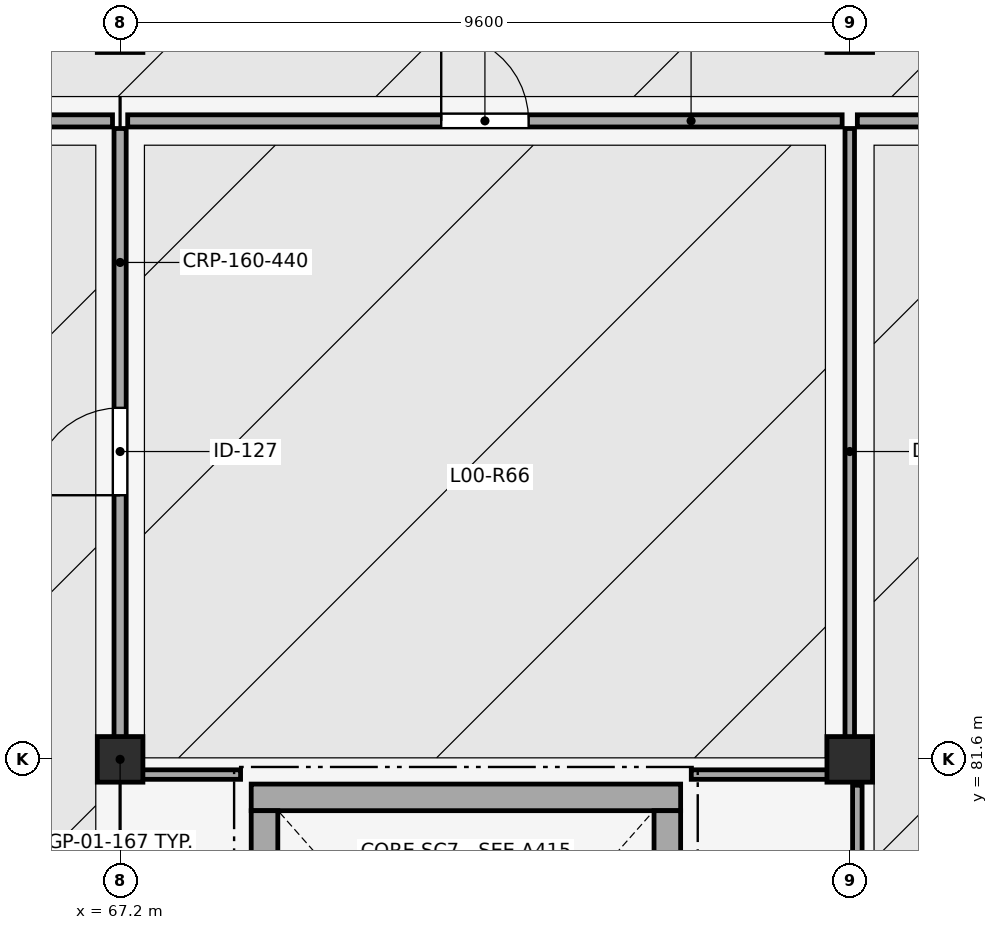
"""IFC4 building model, lengths in metres.
Left out: names, types, materials, properties, quantities, classifications, styles, units other than length and angle.
Written with IfcOpenShell. Run it as: python <this file> out.ifc"""

import sys

from ifc_helpers import new_model, si_unit, direction, frame, frame_2d, origin, origin_2d, place, context, subcontext, project, spatial, rectangle, extrude, element, fill, save


model = new_model("IFC4")
c1 = context("Model", 3, precision=1e-05, world=origin(), true_north=direction((0.0, 1.0)))
c2 = subcontext(c1, "Body", "Model", "MODEL_VIEW")
j1 = project(units=[si_unit("LENGTHUNIT", "METRE"), si_unit("PLANEANGLEUNIT", "RADIAN")], contexts=[c1])
p1 = place(None, origin())
s1 = spatial("IfcSite", under=j1, at=p1, CompositionType="ELEMENT")
p2 = place(p1, origin())
s2 = spatial("IfcBuilding", under=s1, at=p2, CompositionType="ELEMENT")
p3 = place(p2, origin())
s3 = spatial("IfcBuildingStorey", under=s2, at=p3, CompositionType="ELEMENT", Elevation=0.0)
for number, where, z_axis, x_axis in (
    (1, (67.2, 81.6, 0.0), (0.0, 0.0, 1.0), (1.0, 0.0, 0.0)),
    (2, (76.8, 81.6, 0.0), (0.0, 0.0, 1.0), (1.0, 0.0, 0.0)),
):
    element("IfcColumn", number, at=place(p3, frame(where, z_axis=z_axis, x_axis=x_axis)), inside=s3, PredefinedType="COLUMN", context=c2, shape_type="SweptSolid", body=[
        extrude(rectangle(XDim=0.6, YDim=0.6, at=origin_2d()), origin(), (0.0, 0.0, 1.0), 4.8),
    ])
p4 = place(p3, frame((68.925, 81.1, 0.0), z_axis=(0.0, 0.0, 1.0), x_axis=(1.0, 0.0, 0.0)))
e3 = element("IfcWall", 3, at=p4, inside=s3, PredefinedType="SHEAR", context=c2, shape_type="SweptSolid", body=[
    extrude(rectangle(XDim=5.65, YDim=0.35, at=frame_2d((2.825, 0.0))), origin(), (0.0, 0.0, 1.0), 4.55),
])
p5 = place(p3, frame((69.1, 72.975, 0.0), z_axis=(0.0, 0.0, 1.0), x_axis=(0.0, 1.0, 0.0)))
e4 = element("IfcWall", 4, at=p5, inside=s3, PredefinedType="SHEAR", context=c2, shape_type="SweptSolid", body=[
    extrude(rectangle(XDim=7.95, YDim=0.35, at=frame_2d((3.975, 0.0))), origin(), (0.0, 0.0, 1.0), 4.55),
])
p6 = place(p3, frame((74.4, 80.925, 0.0), z_axis=(0.0, 0.0, 1.0), x_axis=(0.0, -1.0, 0.0)))
e5 = element("IfcWall", 5, at=p6, inside=s3, PredefinedType="SHEAR", context=c2, shape_type="SweptSolid", body=[
    extrude(rectangle(XDim=7.95, YDim=0.35, at=frame_2d((3.975, 0.0))), origin(), (0.0, 0.0, 1.0), 4.55),
])
p7 = place(p6, frame((5.68, 0.0, 0.0)))
e6 = element("IfcOpeningElement", 6, at=p7, cuts=e5, PredefinedType="OPENING", context=c2, shape_type="SweptSolid", body=[
    extrude(rectangle(XDim=2.05, YDim=2.15, at=frame_2d((1.025, 1.075))), frame((0.0, 0.185, 0.0), z_axis=(0.0, -1.0, 0.0), x_axis=(1.0, 0.0, 0.0)), (0.0, 0.0, 1.0), 0.37),
])
p8 = place(p3, frame((67.2, 81.4, 0.0), z_axis=(0.0, 0.0, 1.0), x_axis=(0.0, 1.0, 0.0)))
e7 = element("IfcWall", 7, at=p8, inside=s3, PredefinedType="PARTITIONING", context=c2, shape_type="SweptSolid", body=[
    extrude(rectangle(XDim=8.5, YDim=0.16, at=frame_2d((4.25, 0.0))), origin(), (0.0, 0.0, 1.0), 3.92),
])
p9 = place(p8, frame((3.675, 0.0, 0.0)))
e8 = element("IfcOpeningElement", 8, at=p9, cuts=e7, PredefinedType="OPENING", context=c2, shape_type="SweptSolid", body=[
    extrude(rectangle(XDim=1.15, YDim=2.2, at=frame_2d((0.575, 1.1))), frame((0.0, 0.09, 0.0), z_axis=(0.0, -1.0, 0.0), x_axis=(1.0, 0.0, 0.0)), (0.0, 0.0, 1.0), 0.18),
])
p10 = place(p3, frame((55.8, 90.0, 0.0), z_axis=(0.0, 0.0, 1.0), x_axis=(1.0, 0.0, 0.0)))
e9 = element("IfcWall", 9, at=p10, inside=s3, PredefinedType="PARTITIONING", context=c2, shape_type="SweptSolid", body=[
    extrude(rectangle(XDim=11.3, YDim=0.16, at=frame_2d((5.65, 0.0))), origin(), (0.0, 0.0, 1.0), 4.42),
])
p11 = place(p10, frame((4.75, 0.0, 0.0)))
e10 = element("IfcOpeningElement", 10, at=p11, cuts=e9, PredefinedType="OPENING", context=c2, shape_type="SweptSolid", body=[
    extrude(rectangle(XDim=1.8, YDim=2.15, at=frame_2d((0.9, 1.075))), frame((0.0, 0.09, 0.0), z_axis=(0.0, -1.0, 0.0), x_axis=(1.0, 0.0, 0.0)), (0.0, 0.0, 1.0), 0.18),
])
p12 = place(p3, frame((76.8, 81.4, 0.0), z_axis=(0.0, 0.0, 1.0), x_axis=(0.0, 1.0, 0.0)))
e11 = element("IfcWall", 11, at=p12, inside=s3, PredefinedType="PARTITIONING", context=c2, shape_type="SweptSolid", body=[
    extrude(rectangle(XDim=8.5, YDim=0.125, at=frame_2d((4.25, 0.0))), origin(), (0.0, 0.0, 1.0), 3.92),
])
p13 = place(p3, frame((67.3, 90.0, 0.0), z_axis=(0.0, 0.0, 1.0), x_axis=(1.0, 0.0, 0.0)))
e12 = element("IfcWall", 12, at=p13, inside=s3, PredefinedType="PARTITIONING", context=c2, shape_type="SweptSolid", body=[
    extrude(rectangle(XDim=9.4, YDim=0.16, at=frame_2d((4.7, 0.0))), origin(), (0.0, 0.0, 1.0), 4.42),
])
p14 = place(p13, frame((4.125, 0.0, 0.0)))
e13 = element("IfcOpeningElement", 13, at=p14, cuts=e12, PredefinedType="OPENING", context=c2, shape_type="SweptSolid", body=[
    extrude(rectangle(XDim=1.15, YDim=2.2, at=frame_2d((0.575, 1.1))), frame((0.0, 0.09, 0.0), z_axis=(0.0, -1.0, 0.0), x_axis=(1.0, 0.0, 0.0)), (0.0, 0.0, 1.0), 0.18),
])
p15 = place(p3, frame((76.9, 90.0, 0.0), z_axis=(0.0, 0.0, 1.0), x_axis=(1.0, 0.0, 0.0)))
e14 = element("IfcWall", 14, at=p15, inside=s3, PredefinedType="PARTITIONING", context=c2, shape_type="SweptSolid", body=[
    extrude(rectangle(XDim=19.05, YDim=0.16, at=frame_2d((9.525, 0.0))), origin(), (0.0, 0.0, 1.0), 4.42),
])
p16 = place(p15, frame((6.373, 0.0, 0.0)))
e15 = element("IfcOpeningElement", 15, at=p16, cuts=e14, PredefinedType="OPENING", context=c2, shape_type="SweptSolid", body=[
    extrude(rectangle(XDim=1.15, YDim=2.2, at=frame_2d((0.575, 1.1))), frame((0.0, 0.09, 0.0), z_axis=(0.0, -1.0, 0.0), x_axis=(1.0, 0.0, 0.0)), (0.0, 0.0, 1.0), 0.18),
])
p17 = place(p3, frame((67.44, 81.4, 0.0), z_axis=(0.0, 0.0, 1.0), x_axis=(1.0, 0.0, 0.0)))
e16 = element("IfcWall", 16, at=p17, inside=s3, PredefinedType="PARTITIONING", context=c2, shape_type="SweptSolid", body=[
    extrude(rectangle(XDim=1.345, YDim=0.125, at=frame_2d((0.672, 0.0))), origin(), (0.0, 0.0, 1.0), 3.841),
])
p18 = place(p3, frame((74.715, 81.4, 0.0), z_axis=(0.0, 0.0, 1.0), x_axis=(1.0, 0.0, 0.0)))
e17 = element("IfcWall", 17, at=p18, inside=s3, PredefinedType="PARTITIONING", context=c2, shape_type="SweptSolid", body=[
    extrude(rectangle(XDim=1.845, YDim=0.125, at=frame_2d((0.922, 0.0))), origin(), (0.0, 0.0, 1.0), 3.841),
])
p19 = place(p3, frame((76.9, 72.05, 0.0), z_axis=(0.0, 0.0, 1.0), x_axis=(0.0, 1.0, 0.0)))
e18 = element("IfcWall", 18, at=p19, inside=s3, PredefinedType="PARTITIONING", context=c2, shape_type="SweptSolid", body=[
    extrude(rectangle(XDim=9.21, YDim=0.125, at=frame_2d((4.605, 0.0))), origin(), (0.0, 0.0, 1.0), 3.92),
])
p20 = place(p9, origin())
e19 = element("IfcDoor", 19, at=p20, inside=s3, OperationType="SINGLE_SWING_LEFT", PredefinedType="DOOR", context=c2, shape_type="SweptSolid", body=[
    extrude(rectangle(XDim=1.15, YDim=2.2, at=frame_2d((0.575, 1.1))), frame((0.0, 0.025, 0.0), z_axis=(0.0, -1.0, 0.0), x_axis=(1.0, 0.0, 0.0)), (0.0, 0.0, 1.0), 0.05),
])
fill(e8, e19)
p21 = place(p14, origin())
e20 = element("IfcDoor", 20, at=p21, inside=s3, OperationType="SINGLE_SWING_LEFT", PredefinedType="DOOR", context=c2, shape_type="SweptSolid", body=[
    extrude(rectangle(XDim=1.15, YDim=2.2, at=frame_2d((0.575, 1.1))), frame((0.0, 0.025, 0.0), z_axis=(0.0, -1.0, 0.0), x_axis=(1.0, 0.0, 0.0)), (0.0, 0.0, 1.0), 0.05),
])
fill(e13, e20)
save(model, sys.argv[1])
